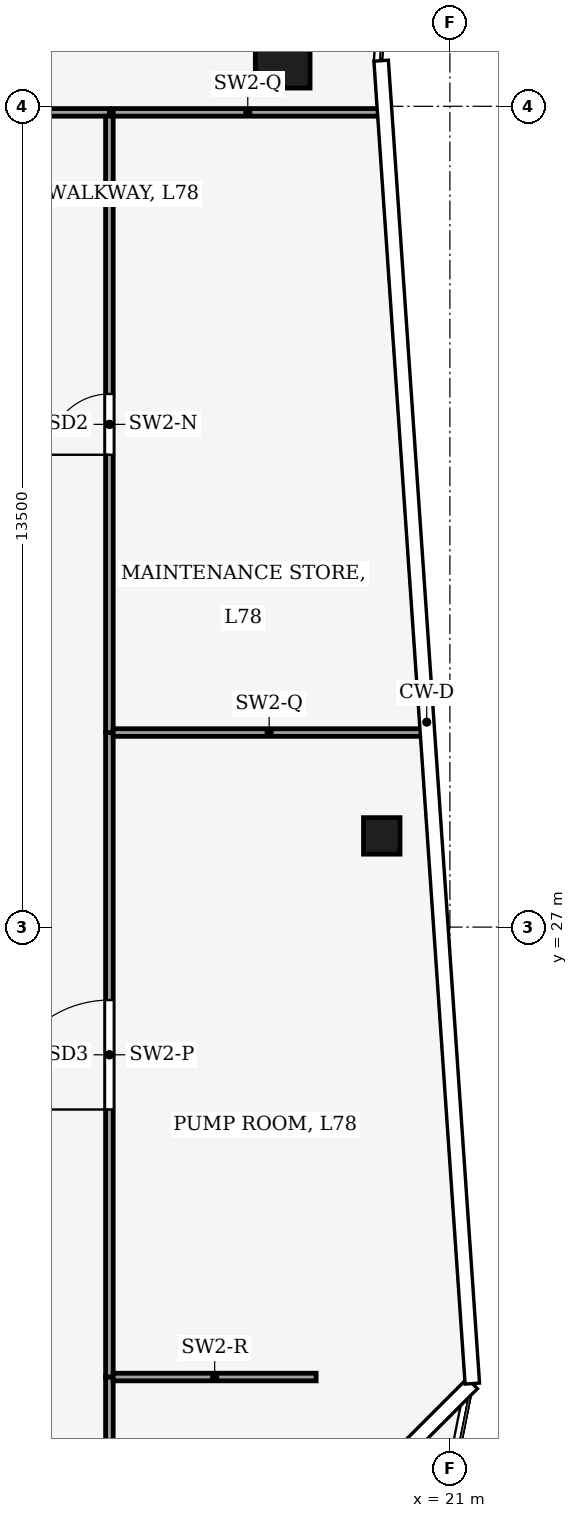
"""IFC4 building model, lengths in metres.
Left out: names, types, materials, properties, quantities, classifications, styles, units other than length and angle.
Written with IfcOpenShell. Run it as: python <this file> out.ifc"""

import sys

from ifc_helpers import new_model, si_unit, direction, frame, frame_2d, origin, origin_2d, place, context, subcontext, project, spatial, rectangle, hollow_rectangle, extrude, element, fill, save


model = new_model("IFC4")
c1 = context("Model", 3, precision=1e-05, world=origin(), true_north=direction((0.0, 1.0)))
c2 = subcontext(c1, "Body", "Model", "MODEL_VIEW")
j1 = project(units=[si_unit("LENGTHUNIT", "METRE"), si_unit("PLANEANGLEUNIT", "RADIAN")], contexts=[c1])
p1 = place(None, origin())
s1 = spatial("IfcSite", under=j1, at=p1, CompositionType="ELEMENT")
p2 = place(p1, origin())
s2 = spatial("IfcBuilding", under=s1, at=p2, CompositionType="ELEMENT")
p3 = place(p2, frame((0.0, 0.0, 340.5)))
s3 = spatial("IfcBuildingStorey", under=s2, at=p3, CompositionType="ELEMENT", Elevation=340.5)
p4 = place(p3, frame((18.25, 41.25, 0.0), z_axis=(0.0, 0.0, 1.0), x_axis=(1.0, 0.0, 0.0)))
e1 = element("IfcColumn", 1, at=p4, inside=s3, PredefinedType="COLUMN", context=c2, shape_type="SweptSolid", body=[
    extrude(hollow_rectangle(XDim=0.9, YDim=0.9, WallThickness=0.04, at=origin_2d()), origin(), (0.0, 0.0, 1.0), 9.0),
])
p5 = place(p3, frame((19.879, 28.5, 0.0), z_axis=(0.0, 0.0, 1.0), x_axis=(1.0, 0.0, 0.0)))
e2 = element("IfcColumn", 2, at=p5, inside=s3, PredefinedType="COLUMN", context=c2, shape_type="SweptSolid", body=[
    extrude(hollow_rectangle(XDim=0.6, YDim=0.6, WallThickness=0.025, at=origin_2d()), origin(), (0.0, 0.0, 1.0), 9.0),
])
p6 = place(p3, frame((15.4, 40.4, 0.0), z_axis=(0.0, 0.0, 1.0), x_axis=(-1.0, 0.0, 0.0)))
e3 = element("IfcWall", 3, at=p6, inside=s3, PredefinedType="PARTITIONING", context=c2, shape_type="SweptSolid", body=[
    extrude(rectangle(XDim=30.8, YDim=0.125, at=frame_2d((15.4, 0.0))), origin(), (0.0, 0.0, 1.0), 8.37),
])
p7 = place(p6, frame((22.5, 0.0, 0.0)))
e4 = element("IfcOpeningElement", 4, at=p7, cuts=e3, PredefinedType="OPENING", context=c2, shape_type="SweptSolid", body=[
    extrude(rectangle(XDim=1.8, YDim=2.4, at=frame_2d((0.9, 1.2))), frame((0.0, 0.073, 0.0), z_axis=(0.0, -1.0, 0.0), x_axis=(1.0, 0.0, 0.0)), (0.0, 0.0, 1.0), 0.145),
])
p8 = place(p6, frame((6.5, 0.0, 0.0)))
e5 = element("IfcOpeningElement", 5, at=p8, cuts=e3, PredefinedType="OPENING", context=c2, shape_type="SweptSolid", body=[
    extrude(rectangle(XDim=1.8, YDim=2.4, at=frame_2d((0.9, 1.2))), frame((0.0, 0.073, 0.0), z_axis=(0.0, -1.0, 0.0), x_axis=(1.0, 0.0, 0.0)), (0.0, 0.0, 1.0), 0.145),
])
p9 = place(p3, frame((15.4, 13.45, 0.0), z_axis=(0.0, 0.0, 1.0), x_axis=(0.0, 1.0, 0.0)))
e6 = element("IfcWall", 6, at=p9, inside=s3, PredefinedType="PARTITIONING", context=c2, shape_type="SweptSolid", body=[
    extrude(rectangle(XDim=6.15, YDim=0.125, at=frame_2d((3.075, 0.0))), origin(), (0.0, 0.0, 1.0), 7.812),
])
p10 = place(p9, frame((2.895, 0.0, 0.0)))
e7 = element("IfcOpeningElement", 7, at=p10, cuts=e6, PredefinedType="OPENING", context=c2, shape_type="SweptSolid", body=[
    extrude(rectangle(XDim=0.9, YDim=2.1, at=frame_2d((0.45, 1.05))), frame((0.0, 0.073, 0.0), z_axis=(0.0, -1.0, 0.0), x_axis=(1.0, 0.0, 0.0)), (0.0, 0.0, 1.0), 0.145),
])
p11 = place(p3, frame((15.4, 19.6, 0.0), z_axis=(0.0, 0.0, 1.0), x_axis=(0.0, 1.0, 0.0)))
e8 = element("IfcWall", 8, at=p11, inside=s3, PredefinedType="PARTITIONING", context=c2, shape_type="SweptSolid", body=[
    extrude(rectangle(XDim=10.6, YDim=0.125, at=frame_2d((5.3, 0.0))), origin(), (0.0, 0.0, 1.0), 8.52),
])
p12 = place(p11, frame((4.4, 0.0, 0.0)))
e9 = element("IfcOpeningElement", 9, at=p12, cuts=e8, PredefinedType="OPENING", context=c2, shape_type="SweptSolid", body=[
    extrude(rectangle(XDim=1.8, YDim=2.4, at=frame_2d((0.9, 1.2))), frame((0.0, 0.073, 0.0), z_axis=(0.0, -1.0, 0.0), x_axis=(1.0, 0.0, 0.0)), (0.0, 0.0, 1.0), 0.145),
])
p13 = place(p3, frame((15.4, 30.2, 0.0), z_axis=(0.0, 0.0, 1.0), x_axis=(0.0, 1.0, 0.0)))
e10 = element("IfcWall", 10, at=p13, inside=s3, PredefinedType="PARTITIONING", context=c2, shape_type="SweptSolid", body=[
    extrude(rectangle(XDim=10.137, YDim=0.125, at=frame_2d((5.069, 0.0))), origin(), (0.0, 0.0, 1.0), 8.12),
])
p14 = place(p13, frame((4.569, 0.0, 0.0)))
e11 = element("IfcOpeningElement", 11, at=p14, cuts=e10, PredefinedType="OPENING", context=c2, shape_type="SweptSolid", body=[
    extrude(rectangle(XDim=1.0, YDim=2.1, at=frame_2d((0.5, 1.05))), frame((0.0, 0.073, 0.0), z_axis=(0.0, -1.0, 0.0), x_axis=(1.0, 0.0, 0.0)), (0.0, 0.0, 1.0), 0.145),
])
p15 = place(p3, frame((19.889, 40.4, 0.0), z_axis=(0.0, 0.0, 1.0), x_axis=(-1.0, 0.0, 0.0)))
e12 = element("IfcWall", 12, at=p15, inside=s3, PredefinedType="PARTITIONING", context=c2, shape_type="SweptSolid", body=[
    extrude(rectangle(XDim=4.426, YDim=0.125, at=frame_2d((2.213, 0.0))), origin(), (0.0, 0.0, 1.0), 8.02),
])
p16 = place(p3, frame((15.462, 19.6, 0.0), z_axis=(0.0, 0.0, 1.0), x_axis=(1.0, 0.0, 0.0)))
e13 = element("IfcWall", 13, at=p16, inside=s3, PredefinedType="PARTITIONING", context=c2, shape_type="SweptSolid", body=[
    extrude(rectangle(XDim=3.338, YDim=0.125, at=frame_2d((1.669, 0.0))), origin(), (0.0, 0.0, 1.0), 8.85),
])
p17 = place(p3, frame((15.462, 30.2, 0.0), z_axis=(0.0, 0.0, 1.0), x_axis=(1.0, 0.0, 0.0)))
e14 = element("IfcWall", 14, at=p17, inside=s3, PredefinedType="PARTITIONING", context=c2, shape_type="SweptSolid", body=[
    extrude(rectangle(XDim=5.13, YDim=0.125, at=frame_2d((2.565, 0.0))), origin(), (0.0, 0.0, 1.0), 8.02),
])
p18 = place(p12, origin())
e15 = element("IfcDoor", 15, at=p18, inside=s3, OperationType="DOUBLE_DOOR_SINGLE_SWING", PredefinedType="DOOR", context=c2, shape_type="SweptSolid", body=[
    extrude(rectangle(XDim=1.8, YDim=2.4, at=frame_2d((0.9, 1.2))), frame((0.0, 0.025, 0.0), z_axis=(0.0, -1.0, 0.0), x_axis=(1.0, 0.0, 0.0)), (0.0, 0.0, 1.0), 0.05),
])
fill(e9, e15)
p19 = place(p14, origin())
e16 = element("IfcDoor", 16, at=p19, inside=s3, OperationType="SINGLE_SWING_LEFT", PredefinedType="DOOR", context=c2, shape_type="SweptSolid", body=[
    extrude(rectangle(XDim=1.0, YDim=2.1, at=frame_2d((0.5, 1.05))), frame((0.0, 0.025, 0.0), z_axis=(0.0, -1.0, 0.0), x_axis=(1.0, 0.0, 0.0)), (0.0, 0.0, 1.0), 0.05),
])
fill(e11, e16)
save(model, sys.argv[1])
